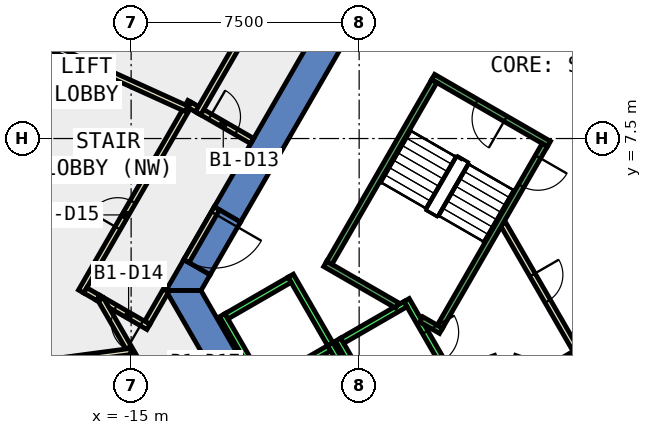
"""IFC4 building model, lengths in metres.
Left out: names, types, materials, properties, quantities, classifications, styles, units other than length and angle.
Written with IfcOpenShell. Run it as: python <this file> out.ifc"""

import sys

from ifc_helpers import new_model, si_unit, direction, frame, frame_2d, origin, place, context, subcontext, project, spatial, polyline, rectangle, outline, extrude, element, fill, save


model = new_model("IFC4")
c1 = context("Model", 3, precision=1e-05, world=origin(), true_north=direction((0.0, 1.0)))
c2 = subcontext(c1, "Body", "Model", "MODEL_VIEW")
j1 = project(units=[si_unit("LENGTHUNIT", "METRE"), si_unit("PLANEANGLEUNIT", "RADIAN")], contexts=[c1])
p1 = place(None, origin())
s1 = spatial("IfcSite", under=j1, at=p1, CompositionType="ELEMENT")
p2 = place(p1, origin())
s2 = spatial("IfcBuilding", under=s1, at=p2, CompositionType="ELEMENT")
p3 = place(p2, frame((0.0, 0.0, -5.5)))
s3 = spatial("IfcBuildingStorey", under=s2, at=p3, CompositionType="ELEMENT", Elevation=-5.5)
p4 = place(p3, frame((0.0, 0.0, -0.42)))
e1 = element("IfcWall", 1, at=p4, inside=s3, PredefinedType="SHEAR", context=c2, shape_type="SweptSolid", body=[
    extrude(outline(polyline([(-12.267, 5.252), (-11.402, 4.752), (-6.351, 13.5), (-6.928, 14.5), (-12.267, 5.252)])), origin(), (0.0, 0.0, 1.0), 5.42),
])
p5 = place(p3, frame((0.0, 0.0, -0.42)))
e2 = element("IfcWall", 2, at=p5, inside=s3, PredefinedType="SHEAR", context=c2, shape_type="SweptSolid", body=[
    extrude(outline(polyline([(-12.402, 3.02), (-13.267, 3.52), (-13.856, 2.5), (-12.702, 2.5), (-12.402, 3.02)])), origin(), (0.0, 0.0, 1.0), 5.42),
])
p6 = place(p3, frame((0.0, 0.0, 3.6)))
e3 = element("IfcWall", 3, at=p6, inside=s3, PredefinedType="SHEAR", context=c2, shape_type="SweptSolid", body=[
    extrude(outline(polyline([(-13.267, 3.52), (-12.402, 3.02), (-11.402, 4.752), (-12.267, 5.252), (-13.267, 3.52)])), origin(), (0.0, 0.0, 1.0), 1.4),
])
p7 = place(p3, frame((0.0, 0.0, -0.42)))
e4 = element("IfcWall", 4, at=p7, inside=s3, PredefinedType="SHEAR", context=c2, shape_type="SweptSolid", body=[
    extrude(outline(polyline([(-13.856, 2.5), (-6.928, -9.5), (-6.351, -8.5), (-12.702, 2.5), (-13.856, 2.5)])), origin(), (0.0, 0.0, 1.0), 5.42),
])
p8 = place(p3, frame((-12.749, 8.417, 0.0), z_axis=(0.0, 0.0, 1.0), x_axis=(0.866010750942, -0.50002537861, 0.0)))
e5 = element("IfcWall", 5, at=p8, inside=s3, PredefinedType="PARTITIONING", context=c2, shape_type="SweptSolid", body=[
    extrude(rectangle(XDim=2.0, YDim=0.2, at=frame_2d((1.0, 0.0))), origin(), (0.0, 0.0, 1.0), 4.9),
])
p9 = place(p8, frame((0.4, 0.0, 0.0)))
e6 = element("IfcOpeningElement", 6, at=p9, cuts=e5, PredefinedType="OPENING", context=c2, shape_type="SweptSolid", body=[
    extrude(rectangle(XDim=1.0, YDim=2.1, at=frame_2d((0.5, 1.05))), frame((0.0, 0.11, 0.0), z_axis=(0.0, -1.0, 0.0), x_axis=(1.0, 0.0, 0.0)), (0.0, 0.0, 1.0), 0.22),
])
p10 = place(p3, frame((-13.856, 2.5, 0.0), z_axis=(0.0, 0.0, 1.0), x_axis=(-0.500114474492, -0.865959301817, 0.0)))
e7 = element("IfcWall", 7, at=p10, inside=s3, PredefinedType="PARTITIONING", context=c2, shape_type="SweptSolid", body=[
    extrude(rectangle(XDim=1.222, YDim=0.2, at=frame_2d((0.611, 0.0))), origin(), (0.0, 0.0, 1.0), 4.9),
])
p11 = place(p3, frame((-14.43, 1.305, 0.0), z_axis=(0.0, 0.0, 1.0), x_axis=(-0.866000389056, 0.500043324278, 0.0)))
e8 = element("IfcWall", 8, at=p11, inside=s3, PredefinedType="PARTITIONING", context=c2, shape_type="SweptSolid", body=[
    extrude(rectangle(XDim=1.91, YDim=0.2, at=frame_2d((0.955, 0.0))), origin(), (0.0, 0.0, 1.0), 4.9),
])
p12 = place(p11, frame((0.254, 0.0, 0.0)))
e9 = element("IfcOpeningElement", 9, at=p12, cuts=e8, PredefinedType="OPENING", context=c2, shape_type="SweptSolid", body=[
    extrude(rectangle(XDim=1.0, YDim=2.1, at=frame_2d((0.5, 1.05))), frame((0.0, 0.11, 0.0), z_axis=(0.0, -1.0, 0.0), x_axis=(1.0, 0.0, 0.0)), (0.0, 0.0, 1.0), 0.22),
])
p13 = place(p3, frame((-16.645, 2.468, 0.0), z_axis=(0.0, 0.0, 1.0), x_axis=(0.499968011863, 0.866043871356, 0.0)))
e10 = element("IfcWall", 10, at=p13, inside=s3, PredefinedType="PARTITIONING", context=c2, shape_type="SweptSolid", body=[
    extrude(rectangle(XDim=7.201, YDim=0.2, at=frame_2d((3.6, 0.0))), origin(), (0.0, 0.0, 1.0), 4.9),
])
p14 = place(p13, frame((2.409, 0.0, 0.0)))
e11 = element("IfcOpeningElement", 11, at=p14, cuts=e10, PredefinedType="OPENING", context=c2, shape_type="SweptSolid", body=[
    extrude(rectangle(XDim=1.0, YDim=2.1, at=frame_2d((0.5, 1.05))), frame((0.0, 0.11, 0.0), z_axis=(0.0, -1.0, 0.0), x_axis=(1.0, 0.0, 0.0)), (0.0, 0.0, 1.0), 0.22),
])
p15 = place(p3, frame((-16.508, 2.505, 0.0), z_axis=(0.0, 0.0, 1.0), x_axis=(0.865494662716, -0.500918145819, 0.0)))
e12 = element("IfcWall", 12, at=p15, inside=s3, PredefinedType="PARTITIONING", context=c2, shape_type="SweptSolid", body=[
    extrude(rectangle(XDim=0.489, YDim=0.2, at=frame_2d((0.244, 0.0))), origin(), (0.0, 0.0, 1.0), 4.9),
])
p16 = place(p3, frame((-13.082, 8.609, 0.0), z_axis=(0.0, 0.0, 1.0), x_axis=(0.865998573537, -0.500046468473, 0.0)))
e13 = element("IfcWall", 13, at=p16, inside=s3, PredefinedType="PARTITIONING", context=c2, shape_type="SweptSolid", body=[
    extrude(rectangle(XDim=0.37, YDim=0.2, at=frame_2d((0.185, 0.0))), origin(), (0.0, 0.0, 1.0), 4.9),
])
p17 = place(p3, frame((-12.799, 8.33, 0.0), z_axis=(0.0, 0.0, 1.0), x_axis=(0.499923440311, 0.86606960103, 0.0)))
e14 = element("IfcWall", 14, at=p17, inside=s3, PredefinedType="PARTITIONING", context=c2, shape_type="SweptSolid", body=[
    extrude(rectangle(XDim=9.534, YDim=0.2, at=frame_2d((4.767, 0.0))), origin(), (0.0, 0.0, 1.0), 4.9),
])
p18 = place(p17, frame((5.986, 0.0, 0.0)))
e15 = element("IfcOpeningElement", 15, at=p18, cuts=e14, PredefinedType="OPENING", context=c2, shape_type="SweptSolid", body=[
    extrude(rectangle(XDim=1.0, YDim=2.1, at=frame_2d((0.5, 1.05))), frame((0.0, 0.11, 0.0), z_axis=(0.0, -1.0, 0.0), x_axis=(1.0, 0.0, 0.0)), (0.0, 0.0, 1.0), 0.22),
])
p19 = place(p3, frame((-13.485, -2.142, 0.0), z_axis=(0.0, 0.0, 1.0), x_axis=(-0.500042049778, 0.866001124973, 0.0)))
e16 = element("IfcWall", 16, at=p19, inside=s3, PredefinedType="PARTITIONING", context=c2, shape_type="SweptSolid", body=[
    extrude(rectangle(XDim=5.025, YDim=0.2, at=frame_2d((2.513, 0.0))), origin(), (0.0, 0.0, 1.0), 4.9),
])
p20 = place(p19, frame((0.47, 0.0, 0.0)))
e17 = element("IfcOpeningElement", 17, at=p20, cuts=e16, PredefinedType="OPENING", context=c2, shape_type="SweptSolid", body=[
    extrude(rectangle(XDim=1.0, YDim=2.1, at=frame_2d((0.5, 1.05))), frame((0.0, 0.11, 0.0), z_axis=(0.0, -1.0, 0.0), x_axis=(1.0, 0.0, 0.0)), (0.0, 0.0, 1.0), 0.22),
])
p21 = place(p3, frame((-22.527, 12.721, 0.0), z_axis=(0.0, 0.0, 1.0), x_axis=(0.910643923171, -0.413192019758, 0.0)))
e18 = element("IfcWall", 18, at=p21, inside=s3, PredefinedType="PARTITIONING", context=c2, shape_type="SweptSolid", body=[
    extrude(rectangle(XDim=10.269, YDim=0.2, at=frame_2d((5.134, 0.0))), origin(), (0.0, 0.0, 1.0), 4.9),
])
p22 = place(p3, frame((-15.01, 0.498, 0.0), z_axis=(0.0, 0.0, 1.0), x_axis=(-0.991211581173, -0.132286058785, 0.0)))
e19 = element("IfcWall", 19, at=p22, inside=s3, PredefinedType="PARTITIONING", context=c2, shape_type="SweptSolid", body=[
    extrude(rectangle(XDim=7.582, YDim=0.2, at=frame_2d((3.791, 0.0))), origin(), (0.0, 0.0, 1.0), 4.9),
])
p23 = place(p3, frame((-0.52, -1.0, 0.0), z_axis=(0.0, 0.0, 1.0), x_axis=(0.50011622646, 0.865958290007, 0.0)))
e20 = element("IfcWall", 20, at=p23, inside=s3, PredefinedType="PARTITIONING", context=c2, shape_type="SweptSolid", body=[
    extrude(rectangle(XDim=4.991, YDim=0.2, at=frame_2d((2.496, 0.0))), origin(), (0.0, 0.0, 1.0), 4.9),
])
p24 = place(p23, frame((1.945, 0.0, 0.0)))
e21 = element("IfcOpeningElement", 21, at=p24, cuts=e20, PredefinedType="OPENING", context=c2, shape_type="SweptSolid", body=[
    extrude(rectangle(XDim=1.0, YDim=2.1, at=frame_2d((0.5, 1.05))), frame((0.0, 0.11, 0.0), z_axis=(0.0, -1.0, 0.0), x_axis=(1.0, 0.0, 0.0)), (0.0, 0.0, 1.0), 0.22),
])
p25 = place(p3, frame((-0.412, 0.414, 0.0), z_axis=(0.0, 0.0, 1.0), x_axis=(-0.866017369001, -0.500013916395, 0.0)))
e22 = element("IfcWall", 22, at=p25, inside=s3, PredefinedType="PARTITIONING", context=c2, shape_type="SweptSolid", body=[
    extrude(rectangle(XDim=1.45, YDim=0.2, at=frame_2d((0.725, 0.0))), origin(), (0.0, 0.0, 1.0), 4.9),
])
p26 = place(p3, frame((-2.07, 0.16, 0.0), z_axis=(0.0, 0.0, 1.0), x_axis=(-0.942199461132, 0.335052496547, 0.0)))
e23 = element("IfcWall", 23, at=p26, inside=s3, PredefinedType="PARTITIONING", context=c2, shape_type="SweptSolid", body=[
    extrude(rectangle(XDim=0.337, YDim=0.2, at=frame_2d((0.169, 0.0))), origin(), (0.0, 0.0, 1.0), 4.9),
])
p27 = place(p3, frame((-3.012, 0.273, 0.0), z_axis=(0.0, 0.0, 1.0), x_axis=(-0.942280615813, -0.334824194261, 0.0)))
e24 = element("IfcWall", 24, at=p27, inside=s3, PredefinedType="PARTITIONING", context=c2, shape_type="SweptSolid", body=[
    extrude(rectangle(XDim=0.338, YDim=0.2, at=frame_2d((0.169, 0.0))), origin(), (0.0, 0.0, 1.0), 4.9),
])
p28 = place(p3, frame((-2.771, 4.7, 0.0), z_axis=(0.0, 0.0, 1.0), x_axis=(0.499969479948, -0.866043023828, 0.0)))
e25 = element("IfcWall", 25, at=p28, inside=s3, PredefinedType="PARTITIONING", context=c2, shape_type="SweptSolid", body=[
    extrude(rectangle(XDim=4.99, YDim=0.2, at=frame_2d((2.495, 0.0))), origin(), (0.0, 0.0, 1.0), 4.9),
])
p29 = place(p28, frame((1.945, 0.0, 0.0)))
e26 = element("IfcOpeningElement", 26, at=p29, cuts=e25, PredefinedType="OPENING", context=c2, shape_type="SweptSolid", body=[
    extrude(rectangle(XDim=1.0, YDim=2.1, at=frame_2d((0.5, 1.05))), frame((0.0, 0.11, 0.0), z_axis=(0.0, -1.0, 0.0), x_axis=(1.0, 0.0, 0.0)), (0.0, 0.0, 1.0), 0.22),
])
p30 = place(p3, frame((-12.18, 5.202, 0.0), z_axis=(0.0, 0.0, 1.0), x_axis=(-0.50002537861, -0.866010750942, 0.0)))
e27 = element("IfcWall", 27, at=p30, inside=s3, PredefinedType="PARTITIONING", context=c2, shape_type="SweptSolid", body=[
    extrude(rectangle(XDim=2.0, YDim=0.2, at=frame_2d((1.0, 0.0))), origin(), (0.0, 0.0, 1.0), 2.4),
])
p31 = place(p30, frame((0.19, 0.0, 0.0)))
e28 = element("IfcOpeningElement", 28, at=p31, cuts=e27, PredefinedType="OPENING", context=c2, shape_type="SweptSolid", body=[
    extrude(rectangle(XDim=1.8, YDim=2.1, at=frame_2d((0.9, 1.05))), frame((0.0, 0.11, 0.0), z_axis=(0.0, -1.0, 0.0), x_axis=(1.0, 0.0, 0.0)), (0.0, 0.0, 1.0), 0.22),
])
p32 = place(p3, frame((-5.94, 2.188, 0.0), z_axis=(0.0, 0.0, 1.0), x_axis=(0.49994636267, -0.866056369097, 0.0)))
e29 = element("IfcWall", 29, at=p32, inside=s3, PredefinedType="STANDARD", context=c2, shape_type="SweptSolid", body=[
    extrude(rectangle(XDim=2.8, YDim=0.2, at=frame_2d((1.4, 0.0))), origin(), (0.0, 0.0, 1.0), 4.9),
])
p33 = place(p32, frame((1.225, 0.0, 0.0)))
e30 = element("IfcOpeningElement", 30, at=p33, cuts=e29, PredefinedType="OPENING", context=c2, shape_type="SweptSolid", body=[
    extrude(rectangle(XDim=1.1, YDim=2.1, at=frame_2d((0.55, 1.05))), frame((0.0, 0.11, 0.0), z_axis=(0.0, -1.0, 0.0), x_axis=(1.0, 0.0, 0.0)), (0.0, 0.0, 1.0), 0.22),
])
p34 = place(p3, frame((-8.192, 0.888, 0.0), z_axis=(0.0, 0.0, 1.0), x_axis=(0.49994636267, -0.866056369097, 0.0)))
e31 = element("IfcWall", 31, at=p34, inside=s3, PredefinedType="STANDARD", context=c2, shape_type="SweptSolid", body=[
    extrude(rectangle(XDim=2.8, YDim=0.2, at=frame_2d((1.4, 0.0))), origin(), (0.0, 0.0, 1.0), 4.9),
])
p35 = place(p3, frame((-5.977, 2.052, 0.0), z_axis=(0.0, 0.0, 1.0), x_axis=(-0.865973769406, -0.500089422704, 0.0)))
e32 = element("IfcWall", 32, at=p35, inside=s3, PredefinedType="STANDARD", context=c2, shape_type="SweptSolid", body=[
    extrude(rectangle(XDim=2.399, YDim=0.2, at=frame_2d((1.2, 0.0))), origin(), (0.0, 0.0, 1.0), 4.9),
])
for number, where, z_axis, x_axis in (
    (33, (-9.751, 2.99, 0.0), (0.0, 0.0, 1.0), (0.5, -0.866, 0.0)),
    (34, (-12.003, 1.69, 0.0), (0.0, 0.0, 1.0), (0.5, -0.866, 0.0)),
):
    element("IfcWall", number, at=place(p3, frame(where, z_axis=z_axis, x_axis=x_axis)), inside=s3, PredefinedType="STANDARD", context=c2, shape_type="SweptSolid", body=[
        extrude(rectangle(XDim=2.8, YDim=0.2, at=frame_2d((1.4, 0.0))), origin(), (0.0, 0.0, 1.0), 3.6),
    ])
for number, where, z_axis, x_axis in (
    (35, (-9.788, 2.853, 0.0), (0.0, 0.0, 1.0), (-0.866, -0.5, 0.0)),
    (36, (-8.488, 0.602, 0.0), (0.0, 0.0, 1.0), (-0.866, -0.5, 0.0)),
):
    element("IfcWall", number, at=place(p3, frame(where, z_axis=z_axis, x_axis=x_axis)), inside=s3, PredefinedType="STANDARD", context=c2, shape_type="SweptSolid", body=[
        extrude(rectangle(XDim=2.399, YDim=0.2, at=frame_2d((1.2, 0.0))), origin(), (0.0, 0.0, 1.0), 3.6),
    ])
p36 = place(p3, frame((-8.451, 0.738, 0.0), z_axis=(0.0, 0.0, 1.0), x_axis=(0.49994636267, -0.866056369097, 0.0)))
e37 = element("IfcWall", 37, at=p36, inside=s3, PredefinedType="STANDARD", context=c2, shape_type="SweptSolid", body=[
    extrude(rectangle(XDim=2.8, YDim=0.2, at=frame_2d((1.4, 0.0))), origin(), (0.0, 0.0, 1.0), 3.6),
])
p37 = place(p3, frame((-1.256, 7.324, 0.0), z_axis=(0.0, 0.0, 1.0), x_axis=(-0.866046073146, 0.499964197906, 0.0)))
e38 = element("IfcWall", 38, at=p37, inside=s3, PredefinedType="STANDARD", context=c2, shape_type="SweptSolid", body=[
    extrude(rectangle(XDim=4.4, YDim=0.2, at=frame_2d((2.2, 0.0))), origin(), (0.0, 0.0, 1.0), 4.9),
])
p38 = place(p37, frame((1.65, 0.0, 0.0)))
e39 = element("IfcOpeningElement", 39, at=p38, cuts=e38, PredefinedType="OPENING", context=c2, shape_type="SweptSolid", body=[
    extrude(rectangle(XDim=1.1, YDim=2.2, at=frame_2d((0.55, 1.1))), frame((0.0, 0.11, 0.0), z_axis=(0.0, -1.0, 0.0), x_axis=(1.0, 0.0, 0.0)), (0.0, 0.0, 1.0), 0.22),
])
p39 = place(p3, frame((-6.25, 2.01, 0.0), z_axis=(0.0, 0.0, 1.0), x_axis=(-0.86611865017, 0.499838457731, 0.0)))
e40 = element("IfcWall", 40, at=p39, inside=s3, PredefinedType="STANDARD", context=c2, shape_type="SweptSolid", body=[
    extrude(rectangle(XDim=2.733, YDim=0.2, at=frame_2d((1.366, 0.0))), origin(), (0.0, 0.0, 1.0), 4.9),
])
p40 = place(p3, frame((-4.806, 1.176, 0.0), z_axis=(0.0, 0.0, 1.0), x_axis=(-0.866558586415, 0.499075361355, 0.0)))
e41 = element("IfcWall", 41, at=p40, inside=s3, PredefinedType="STANDARD", context=c2, shape_type="SweptSolid", body=[
    extrude(rectangle(XDim=0.751, YDim=0.2, at=frame_2d((0.376, 0.0))), origin(), (0.0, 0.0, 1.0), 4.9),
])
p41 = place(p3, frame((-1.393, 7.288, 0.0), z_axis=(0.0, 0.0, 1.0), x_axis=(-0.499963383562, -0.866046543262, 0.0)))
e42 = element("IfcWall", 42, at=p41, inside=s3, PredefinedType="STANDARD", context=c2, shape_type="SweptSolid", body=[
    extrude(rectangle(XDim=6.9, YDim=0.2, at=frame_2d((3.45, 0.0))), origin(), (0.0, 0.0, 1.0), 4.9),
])
p42 = place(p41, frame((0.45, 0.0, 0.0)))
e43 = element("IfcOpeningElement", 43, at=p42, cuts=e42, PredefinedType="OPENING", context=c2, shape_type="SweptSolid", body=[
    extrude(rectangle(XDim=1.1, YDim=2.2, at=frame_2d((0.55, 1.1))), frame((0.0, 0.11, 0.0), z_axis=(0.0, -1.0, 0.0), x_axis=(1.0, 0.0, 0.0)), (0.0, 0.0, 1.0), 0.22),
])
p43 = place(p3, frame((-5.03, 9.388, 0.0), z_axis=(0.0, 0.0, 1.0), x_axis=(-0.499978703459, -0.866037698999, 0.0)))
e44 = element("IfcWall", 44, at=p43, inside=s3, PredefinedType="STANDARD", context=c2, shape_type="SweptSolid", body=[
    extrude(rectangle(XDim=6.9, YDim=0.2, at=frame_2d((3.45, 0.0))), origin(), (0.0, 0.0, 1.0), 4.9),
])
p44 = place(p9, origin())
e45 = element("IfcDoor", 45, at=p44, inside=s3, OperationType="SINGLE_SWING_LEFT", PredefinedType="DOOR", context=c2, shape_type="SweptSolid", body=[
    extrude(rectangle(XDim=1.0, YDim=2.1, at=frame_2d((0.5, 1.05))), frame((0.0, 0.025, 0.0), z_axis=(0.0, -1.0, 0.0), x_axis=(1.0, 0.0, 0.0)), (0.0, 0.0, 1.0), 0.05),
])
fill(e6, e45)
p45 = place(p12, origin())
e46 = element("IfcDoor", 46, at=p45, inside=s3, OperationType="SINGLE_SWING_RIGHT", PredefinedType="DOOR", context=c2, shape_type="SweptSolid", body=[
    extrude(rectangle(XDim=1.0, YDim=2.1, at=frame_2d((0.5, 1.05))), frame((0.0, 0.025, 0.0), z_axis=(0.0, -1.0, 0.0), x_axis=(1.0, 0.0, 0.0)), (0.0, 0.0, 1.0), 0.05),
])
fill(e9, e46)
p46 = place(p14, origin())
e47 = element("IfcDoor", 47, at=p46, inside=s3, OperationType="SINGLE_SWING_LEFT", PredefinedType="DOOR", context=c2, shape_type="SweptSolid", body=[
    extrude(rectangle(XDim=1.0, YDim=2.1, at=frame_2d((0.5, 1.05))), frame((0.0, 0.025, 0.0), z_axis=(0.0, -1.0, 0.0), x_axis=(1.0, 0.0, 0.0)), (0.0, 0.0, 1.0), 0.05),
])
fill(e11, e47)
p47 = place(p29, origin())
e48 = element("IfcDoor", 48, at=p47, inside=s3, OperationType="SINGLE_SWING_RIGHT", PredefinedType="DOOR", context=c2, shape_type="SweptSolid", body=[
    extrude(rectangle(XDim=1.0, YDim=2.1, at=frame_2d((0.5, 1.05))), frame((0.0, 0.025, 0.0), z_axis=(0.0, -1.0, 0.0), x_axis=(1.0, 0.0, 0.0)), (0.0, 0.0, 1.0), 0.05),
])
fill(e26, e48)
p48 = place(p31, origin())
e49 = element("IfcDoor", 49, at=p48, inside=s3, OperationType="DOUBLE_DOOR_SINGLE_SWING", PredefinedType="DOOR", context=c2, shape_type="SweptSolid", body=[
    extrude(rectangle(XDim=1.8, YDim=2.1, at=frame_2d((0.9, 1.05))), frame((0.0, 0.025, 0.0), z_axis=(0.0, -1.0, 0.0), x_axis=(1.0, 0.0, 0.0)), (0.0, 0.0, 1.0), 0.05),
])
fill(e28, e49)
p49 = place(p33, origin())
e50 = element("IfcDoor", 50, at=p49, inside=s3, OperationType="SLIDING_TO_LEFT", PredefinedType="DOOR", context=c2, shape_type="SweptSolid", body=[
    extrude(rectangle(XDim=1.1, YDim=2.1, at=frame_2d((0.55, 1.05))), frame((0.0, 0.025, 0.0), z_axis=(0.0, -1.0, 0.0), x_axis=(1.0, 0.0, 0.0)), (0.0, 0.0, 1.0), 0.05),
])
fill(e30, e50)
p50 = place(p42, origin())
e51 = element("IfcDoor", 51, at=p50, inside=s3, OperationType="SINGLE_SWING_LEFT", PredefinedType="DOOR", context=c2, shape_type="SweptSolid", body=[
    extrude(rectangle(XDim=1.1, YDim=2.2, at=frame_2d((0.55, 1.1))), frame((0.0, 0.025, 0.0), z_axis=(0.0, -1.0, 0.0), x_axis=(1.0, 0.0, 0.0)), (0.0, 0.0, 1.0), 0.05),
])
fill(e43, e51)
p51 = place(p38, origin())
e52 = element("IfcDoor", 52, at=p51, inside=s3, OperationType="SINGLE_SWING_LEFT", PredefinedType="DOOR", context=c2, shape_type="SweptSolid", body=[
    extrude(rectangle(XDim=1.1, YDim=2.2, at=frame_2d((0.55, 1.1))), frame((0.0, 0.025, 0.0), z_axis=(0.0, -1.0, 0.0), x_axis=(1.0, 0.0, 0.0)), (0.0, 0.0, 1.0), 0.05),
])
fill(e39, e52)
save(model, sys.argv[1])
